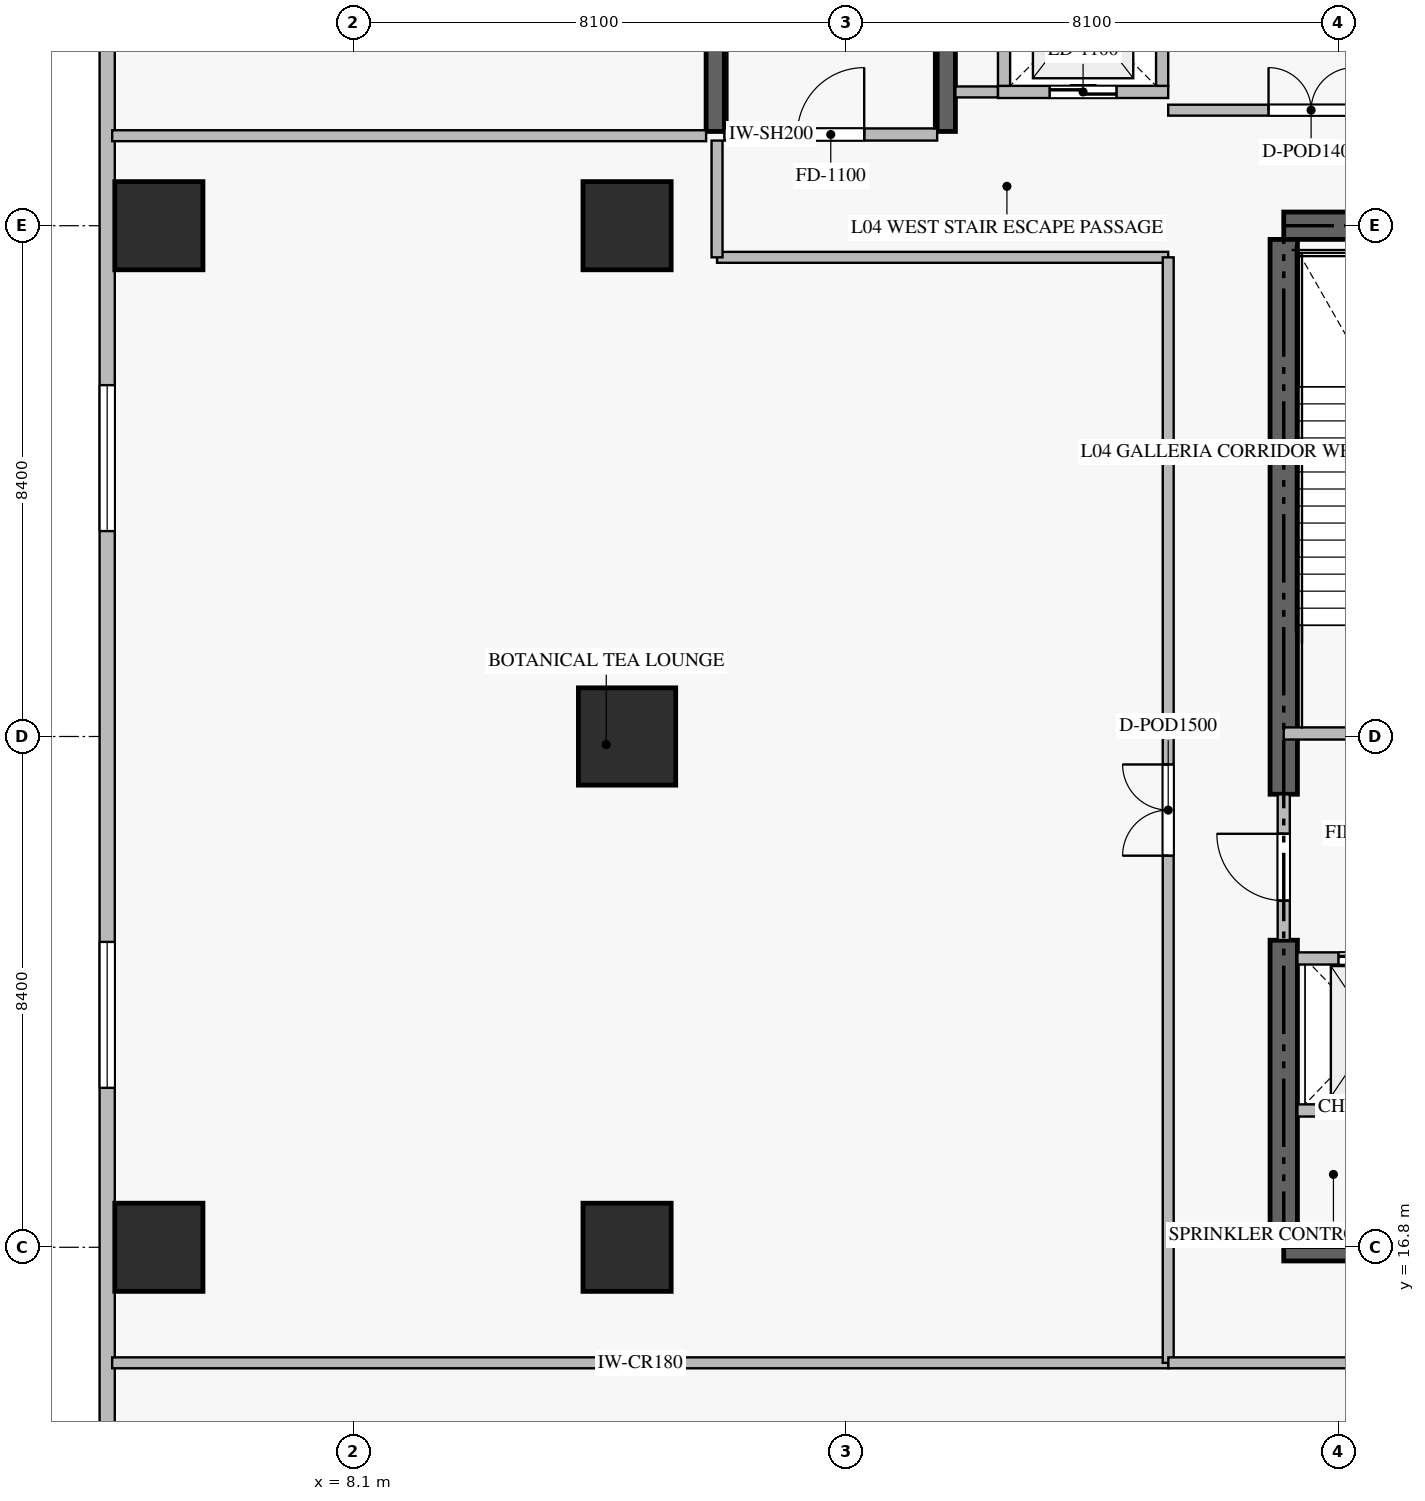
"""IFC4 building model, lengths in metres.
Left out: names, types, materials, properties, quantities, classifications, styles, units other than length and angle.
Written with IfcOpenShell. Run it as: python <this file> out.ifc"""

import sys

from ifc_helpers import new_model, si_unit, direction, frame, frame_2d, origin, origin_2d, place, context, subcontext, project, spatial, rectangle, extrude, source, transform, mapped, element, fill, save


model = new_model("IFC4")
c1 = context("Model", 3, precision=1e-05, world=origin(), true_north=direction((0.0, 1.0)))
c2 = subcontext(c1, "Body", "Model", "MODEL_VIEW")
j1 = project(units=[si_unit("LENGTHUNIT", "METRE"), si_unit("PLANEANGLEUNIT", "RADIAN")], contexts=[c1])
p1 = place(None, origin())
s1 = spatial("IfcSite", under=j1, at=p1, CompositionType="ELEMENT")
p2 = place(p1, origin())
s2 = spatial("IfcBuilding", under=s1, at=p2, CompositionType="ELEMENT")
p3 = place(p2, frame((0.0, 0.0, 21.0)))
s3 = spatial("IfcBuildingStorey", under=s2, at=p3, CompositionType="ELEMENT", Elevation=21.0)
for number, where, z_axis, x_axis in (
    (1, (23.4, 16.8, -0.85), (0.0, 0.0, 1.0), (1.0, 0.0, 0.0)),
    (2, (41.4, 33.6, -0.85), (0.0, 0.0, 1.0), (-1.0, 0.0, 0.0)),
):
    element("IfcWall", number, at=place(p3, frame(where, z_axis=z_axis, x_axis=x_axis)), inside=s3, PredefinedType="SHEAR", context=c2, shape_type="SweptSolid", body=[
        extrude(rectangle(XDim=18.0, YDim=0.45, at=frame_2d((9.0, 0.0))), origin(), (0.0, 0.0, 1.0), 6.108),
    ])
p4 = place(p3, frame((23.4, 17.025, -0.85), z_axis=(0.0, 0.0, 1.0), x_axis=(0.0, 1.0, 0.0)))
e3 = element("IfcWall", 3, at=p4, inside=s3, PredefinedType="SHEAR", context=c2, shape_type="SweptSolid", body=[
    extrude(rectangle(XDim=4.825, YDim=0.45, at=frame_2d((2.413, 0.0))), origin(), (0.0, 0.0, 1.0), 6.108),
])
p5 = place(p3, frame((23.4, 24.25, -0.85), z_axis=(0.0, 0.0, 1.0), x_axis=(0.0, 1.0, 0.0)))
e4 = element("IfcWall", 4, at=p5, inside=s3, PredefinedType="SHEAR", context=c2, shape_type="SweptSolid", body=[
    extrude(rectangle(XDim=9.125, YDim=0.45, at=frame_2d((4.562, 0.0))), origin(), (0.0, 0.0, 1.0), 6.108),
])
m1 = source(origin(), c2, "Body", "SweptSolid", [
    extrude(rectangle(XDim=1.45, YDim=1.45, at=origin_2d()), origin(), (0.0, 0.0, 1.0), 6.11),
])
p6 = place(p3, frame((12.6, 16.8, -0.85), z_axis=(0.0, 0.0, 1.0), x_axis=(1.0, 0.0, 0.0)))
e5 = element("IfcColumn", 5, at=p6, inside=s3, PredefinedType="COLUMN", context=c2, shape_type="MappedRepresentation", body=[
    mapped(m1, transform((0.0, 0.0, 0.0), scale=1.0)),
])
m2 = source(origin(), c2, "Body", "SweptSolid", [
    extrude(rectangle(XDim=1.6, YDim=1.6, at=origin_2d()), origin(), (0.0, 0.0, 1.0), 6.11),
])
p7 = place(p3, frame((12.6, 25.2, -0.85), z_axis=(0.0, 0.0, 1.0), x_axis=(1.0, 0.0, 0.0)))
e6 = element("IfcColumn", 6, at=p7, inside=s3, PredefinedType="COLUMN", context=c2, shape_type="MappedRepresentation", body=[
    mapped(m2, transform((0.0, 0.0, 0.0), scale=1.0)),
])
for number, where, z_axis, x_axis in (
    (7, (12.6, 33.6, -0.85), (0.0, 0.0, 1.0), (1.0, 0.0, 0.0)),
    (8, (4.9, 16.8, -0.85), (0.0, 0.0, 1.0), (1.0, 0.0, 0.0)),
    (9, (4.9, 33.6, -0.85), (0.0, 0.0, 1.0), (1.0, 0.0, 0.0)),
):
    element("IfcColumn", number, at=place(p3, frame(where, z_axis=z_axis, x_axis=x_axis)), inside=s3, PredefinedType="COLUMN", context=c2, shape_type="MappedRepresentation", body=[
        mapped(m1, transform((0.0, 0.0, 0.0), scale=1.0)),
    ])
p8 = place(p3, frame((4.05, 45.475, 0.0), z_axis=(0.0, 0.0, 1.0), x_axis=(0.0, -1.0, 0.0)))
e10 = element("IfcWall", 10, at=p8, inside=s3, PredefinedType="ELEMENTEDWALL", context=c2, shape_type="SweptSolid", body=[
    extrude(rectangle(XDim=40.55, YDim=0.25, at=frame_2d((20.275, 0.0))), origin(), (0.0, 0.0, 1.0), 5.245),
])
p9 = place(p8, frame((14.497, 0.0, 0.6)))
e11 = element("IfcOpeningElement", 11, at=p9, cuts=e10, PredefinedType="OPENING", context=c2, shape_type="SweptSolid", body=[
    extrude(rectangle(XDim=2.4, YDim=2.6, at=frame_2d((1.2, 1.3))), frame((0.0, 0.135, 0.0), z_axis=(0.0, -1.0, 0.0), x_axis=(1.0, 0.0, 0.0)), (0.0, 0.0, 1.0), 0.27),
])
p10 = place(p8, frame((23.653, 0.0, 0.6)))
e12 = element("IfcOpeningElement", 12, at=p10, cuts=e10, PredefinedType="OPENING", context=c2, shape_type="SweptSolid", body=[
    extrude(rectangle(XDim=2.4, YDim=2.6, at=frame_2d((1.2, 1.3))), frame((0.0, 0.135, 0.0), z_axis=(0.0, -1.0, 0.0), x_axis=(1.0, 0.0, 0.0)), (0.0, 0.0, 1.0), 0.27),
])
p11 = place(p3, frame((23.4, 25.25, 0.0), z_axis=(0.0, 0.0, 1.0), x_axis=(1.0, 0.0, 0.0)))
e13 = element("IfcWall", 13, at=p11, inside=s3, PredefinedType="STANDARD", context=c2, shape_type="SweptSolid", body=[
    extrude(rectangle(XDim=4.45, YDim=0.2, at=frame_2d((2.225, 0.0))), origin(), (0.0, 0.0, 1.0), 5.26),
])
p12 = place(p11, frame((1.65, 0.0, 0.0)))
e14 = element("IfcOpeningElement", 14, at=p12, cuts=e13, PredefinedType="OPENING", context=c2, shape_type="SweptSolid", body=[
    extrude(rectangle(XDim=1.1, YDim=2.15, at=frame_2d((0.55, 1.075))), frame((0.0, 0.11, 0.0), z_axis=(0.0, -1.0, 0.0), x_axis=(1.0, 0.0, 0.0)), (0.0, 0.0, 1.0), 0.22),
])
for number, where, z_axis, x_axis in (
    (15, (14.05, 35.15, -0.85), (0.0, 0.0, 1.0), (0.0, 1.0, 0.0)),
    (16, (17.85, 35.15, -0.85), (0.0, 0.0, 1.0), (0.0, 1.0, 0.0)),
):
    element("IfcWall", number, at=place(p3, frame(where, z_axis=z_axis, x_axis=x_axis)), inside=s3, PredefinedType="SHEAR", context=c2, shape_type="SweptSolid", body=[
        extrude(rectangle(XDim=7.9, YDim=0.3, at=frame_2d((3.95, 0.0))), origin(), (0.0, 0.0, 1.0), 6.108),
    ])
p13 = place(p3, frame((14.2, 35.1, 0.0), z_axis=(0.0, 0.0, 1.0), x_axis=(1.0, 0.0, 0.0)))
e17 = element("IfcWall", 17, at=p13, inside=s3, PredefinedType="STANDARD", context=c2, shape_type="SweptSolid", body=[
    extrude(rectangle(XDim=3.5, YDim=0.2, at=frame_2d((1.75, 0.0))), origin(), (0.0, 0.0, 1.0), 5.26),
])
p14 = place(p13, frame((1.2, 0.0, 0.0)))
e18 = element("IfcOpeningElement", 18, at=p14, cuts=e17, PredefinedType="OPENING", context=c2, shape_type="SweptSolid", body=[
    extrude(rectangle(XDim=1.1, YDim=2.15, at=frame_2d((0.55, 1.075))), frame((0.0, 0.11, 0.0), z_axis=(0.0, -1.0, 0.0), x_axis=(1.0, 0.0, 0.0)), (0.0, 0.0, 1.0), 0.22),
])
p15 = place(p3, frame((23.625, 21.55, 0.0), z_axis=(0.0, 0.0, 1.0), x_axis=(1.0, 0.0, 0.0)))
e19 = element("IfcWall", 19, at=p15, inside=s3, PredefinedType="STANDARD", context=c2, shape_type="SweptSolid", body=[
    extrude(rectangle(XDim=2.425, YDim=0.2, at=frame_2d((1.212, 0.0))), origin(), (0.0, 0.0, 1.0), 5.26),
])
p16 = place(p15, frame((0.675, 0.0, 0.0)))
e20 = element("IfcOpeningElement", 20, at=p16, cuts=e19, PredefinedType="OPENING", context=c2, shape_type="SweptSolid", body=[
    extrude(rectangle(XDim=1.2, YDim=2.2, at=frame_2d((0.6, 1.1))), frame((0.0, 0.11, 0.0), z_axis=(0.0, -1.0, 0.0), x_axis=(1.0, 0.0, 0.0)), (0.0, 0.0, 1.0), 0.22),
])
p17 = place(p3, frame((18.7, 35.8, 0.0), z_axis=(0.0, 0.0, 1.0), x_axis=(1.0, 0.0, 0.0)))
e21 = element("IfcWall", 21, at=p17, inside=s3, PredefinedType="STANDARD", context=c2, shape_type="SweptSolid", body=[
    extrude(rectangle(XDim=2.8, YDim=0.2, at=frame_2d((1.4, 0.0))), origin(), (0.0, 0.0, 1.0), 5.26),
])
p18 = place(p17, frame((0.85, 0.0, 0.0)))
e22 = element("IfcOpeningElement", 22, at=p18, cuts=e21, PredefinedType="OPENING", context=c2, shape_type="SweptSolid", body=[
    extrude(rectangle(XDim=1.1, YDim=2.2, at=frame_2d((0.55, 1.1))), frame((0.0, 0.11, 0.0), z_axis=(0.0, -1.0, 0.0), x_axis=(1.0, 0.0, 0.0)), (0.0, 0.0, 1.0), 0.22),
])
for number, where, z_axis, x_axis in (
    (23, (18.8, 35.9, 0.0), (0.0, 0.0, 1.0), (0.0, 1.0, 0.0)),
    (24, (21.4, 35.9, 0.0), (0.0, 0.0, 1.0), (0.0, 1.0, 0.0)),
):
    element("IfcWall", number, at=place(p3, frame(where, z_axis=z_axis, x_axis=x_axis)), inside=s3, PredefinedType="STANDARD", context=c2, shape_type="SweptSolid", body=[
        extrude(rectangle(XDim=2.4, YDim=0.2, at=frame_2d((1.2, 0.0))), origin(), (0.0, 0.0, 1.0), 5.26),
    ])
p19 = place(p3, frame((23.625, 19.05, 0.0), z_axis=(0.0, 0.0, 1.0), x_axis=(1.0, 0.0, 0.0)))
e25 = element("IfcWall", 25, at=p19, inside=s3, PredefinedType="STANDARD", context=c2, shape_type="SweptSolid", body=[
    extrude(rectangle(XDim=2.425, YDim=0.2, at=frame_2d((1.212, 0.0))), origin(), (0.0, 0.0, 1.0), 5.26),
])
p20 = place(p3, frame((23.4, 21.852, 0.0), z_axis=(0.0, 0.0, 1.0), x_axis=(0.0, 1.0, 0.0)))
e26 = element("IfcWall", 26, at=p20, inside=s3, PredefinedType="STANDARD", context=c2, shape_type="SweptSolid", body=[
    extrude(rectangle(XDim=2.396, YDim=0.2, at=frame_2d((1.198, 0.0))), origin(), (0.0, 0.0, 1.0), 5.26),
])
p21 = place(p20, frame((0.648, 0.0, 0.0)))
e27 = element("IfcOpeningElement", 27, at=p21, cuts=e26, PredefinedType="OPENING", context=c2, shape_type="SweptSolid", body=[
    extrude(rectangle(XDim=1.1, YDim=2.15, at=frame_2d((0.55, 1.075))), frame((0.0, 0.11, 0.0), z_axis=(0.0, -1.0, 0.0), x_axis=(1.0, 0.0, 0.0)), (0.0, 0.0, 1.0), 0.22),
])
p22 = place(p3, frame((4.132, 14.9, 0.0), z_axis=(0.0, 0.0, 1.0), x_axis=(1.0, 0.0, 0.0)))
e28 = element("IfcWall", 28, at=p22, inside=s3, PredefinedType="PARTITIONING", context=c2, shape_type="SweptSolid", body=[
    extrude(rectangle(XDim=17.368, YDim=0.18, at=frame_2d((8.684, 0.0))), origin(), (0.0, 0.0, 1.0), 5.26),
])
p23 = place(p3, frame((4.132, 35.08, 0.0), z_axis=(0.0, 0.0, 1.0), x_axis=(1.0, 0.0, 0.0)))
e29 = element("IfcWall", 29, at=p23, inside=s3, PredefinedType="PARTITIONING", context=c2, shape_type="SweptSolid", body=[
    extrude(rectangle(XDim=9.768, YDim=0.18, at=frame_2d((4.884, 0.0))), origin(), (0.0, 0.0, 1.0), 5.26),
])
p24 = place(p3, frame((14.08, 33.08, 0.0), z_axis=(0.0, 0.0, 1.0), x_axis=(1.0, 0.0, 0.0)))
e30 = element("IfcWall", 30, at=p24, inside=s3, PredefinedType="PARTITIONING", context=c2, shape_type="SweptSolid", body=[
    extrude(rectangle(XDim=7.42, YDim=0.18, at=frame_2d((3.71, 0.0))), origin(), (0.0, 0.0, 1.0), 2.845),
])
p25 = place(p3, frame((18.0, 35.8, 0.0), z_axis=(0.0, 0.0, 1.0), x_axis=(1.0, 0.0, 0.0)))
e31 = element("IfcWall", 31, at=p25, inside=s3, PredefinedType="PARTITIONING", context=c2, shape_type="SweptSolid", body=[
    extrude(rectangle(XDim=0.698, YDim=0.18, at=frame_2d((0.349, 0.0))), origin(), (0.0, 0.0, 1.0), 5.26),
])
p26 = place(p3, frame((14.08, 33.08, 0.0), z_axis=(0.0, 0.0, 1.0), x_axis=(0.0, 1.0, 0.0)))
e32 = element("IfcWall", 32, at=p26, inside=s3, PredefinedType="PARTITIONING", context=c2, shape_type="SweptSolid", body=[
    extrude(rectangle(XDim=1.92, YDim=0.18, at=frame_2d((0.96, 0.0))), origin(), (0.0, 0.0, 1.0), 5.26),
])
p27 = place(p3, frame((21.5, 14.9, 0.0), z_axis=(0.0, 0.0, 1.0), x_axis=(0.0, 1.0, 0.0)))
e33 = element("IfcWall", 33, at=p27, inside=s3, PredefinedType="PARTITIONING", context=c2, shape_type="SweptSolid", body=[
    extrude(rectangle(XDim=18.18, YDim=0.18, at=frame_2d((9.09, 0.0))), origin(), (0.0, 0.0, 1.0), 5.26),
])
p28 = place(p27, frame((8.34, 0.0, 0.0)))
e34 = element("IfcOpeningElement", 34, at=p28, cuts=e33, PredefinedType="OPENING", context=c2, shape_type="SweptSolid", body=[
    extrude(rectangle(XDim=1.5, YDim=2.25, at=frame_2d((0.75, 1.125))), frame((0.0, 0.1, 0.0), z_axis=(0.0, -1.0, 0.0), x_axis=(1.0, 0.0, 0.0)), (0.0, 0.0, 1.0), 0.2),
])
p29 = place(p3, frame((21.502, 14.9, 0.0), z_axis=(0.0, 0.0, 1.0), x_axis=(1.0, 0.0, 0.0)))
e35 = element("IfcWall", 35, at=p29, inside=s3, PredefinedType="PARTITIONING", context=c2, shape_type="SweptSolid", body=[
    extrude(rectangle(XDim=9.098, YDim=0.18, at=frame_2d((4.549, 0.0))), origin(), (0.0, 0.0, 1.0), 5.26),
])
p30 = place(p29, frame((3.799, 0.0, 0.0)))
e36 = element("IfcOpeningElement", 36, at=p30, cuts=e35, PredefinedType="OPENING", context=c2, shape_type="SweptSolid", body=[
    extrude(rectangle(XDim=1.5, YDim=2.25, at=frame_2d((0.75, 1.125))), frame((0.0, 0.1, 0.0), z_axis=(0.0, -1.0, 0.0), x_axis=(1.0, 0.0, 0.0)), (0.0, 0.0, 1.0), 0.2),
])
p31 = place(p3, frame((21.5, 35.5, 0.0), z_axis=(0.0, 0.0, 1.0), x_axis=(1.0, 0.0, 0.0)))
e37 = element("IfcWall", 37, at=p31, inside=s3, PredefinedType="PARTITIONING", context=c2, shape_type="SweptSolid", body=[
    extrude(rectangle(XDim=4.7, YDim=0.18, at=frame_2d((2.35, 0.0))), origin(), (0.0, 0.0, 1.0), 5.26),
])
p32 = place(p31, frame((1.65, 0.0, 0.0)))
e38 = element("IfcOpeningElement", 38, at=p32, cuts=e37, PredefinedType="OPENING", context=c2, shape_type="SweptSolid", body=[
    extrude(rectangle(XDim=1.4, YDim=2.25, at=frame_2d((0.7, 1.125))), frame((0.0, 0.1, 0.0), z_axis=(0.0, -1.0, 0.0), x_axis=(1.0, 0.0, 0.0)), (0.0, 0.0, 1.0), 0.2),
])
m3 = source(origin(), c2, "Body", "SweptSolid", [
    extrude(rectangle(XDim=2.4, YDim=2.6, at=frame_2d((1.2, 1.3))), frame((0.0, 0.03, 0.0), z_axis=(0.0, -1.0, 0.0), x_axis=(1.0, 0.0, 0.0)), (0.0, 0.0, 1.0), 0.06),
])
p33 = place(p9, origin())
e39 = element("IfcWindow", 39, at=p33, inside=s3, PartitioningType="SINGLE_PANEL", PredefinedType="WINDOW", context=c2, shape_type="MappedRepresentation", body=[
    mapped(m3, transform((0.0, 0.0, 0.0), scale=1.0)),
])
fill(e11, e39)
p34 = place(p10, origin())
e40 = element("IfcWindow", 40, at=p34, inside=s3, PartitioningType="SINGLE_PANEL", PredefinedType="WINDOW", context=c2, shape_type="MappedRepresentation", body=[
    mapped(m3, transform((0.0, 0.0, 0.0), scale=1.0)),
])
fill(e12, e40)
m4 = source(origin(), c2, "Body", "SweptSolid", [
    extrude(rectangle(XDim=1.1, YDim=2.15, at=frame_2d((0.55, 1.075))), frame((0.0, 0.025, 0.0), z_axis=(0.0, -1.0, 0.0), x_axis=(1.0, 0.0, 0.0)), (0.0, 0.0, 1.0), 0.05),
])
p35 = place(p14, origin())
e41 = element("IfcDoor", 41, at=p35, inside=s3, OperationType="SINGLE_SWING_RIGHT", PredefinedType="DOOR", context=c2, shape_type="MappedRepresentation", body=[
    mapped(m4, transform((0.0, 0.0, 0.0), scale=1.0)),
])
fill(e18, e41)
m5 = source(origin(), c2, "Body", "SweptSolid", [
    extrude(rectangle(XDim=1.2, YDim=2.2, at=frame_2d((0.6, 1.1))), frame((0.0, 0.025, 0.0), z_axis=(0.0, -1.0, 0.0), x_axis=(1.0, 0.0, 0.0)), (0.0, 0.0, 1.0), 0.05),
])
p36 = place(p16, origin())
e42 = element("IfcDoor", 42, at=p36, inside=s3, OperationType="DOUBLE_DOOR_SLIDING", PredefinedType="DOOR", context=c2, shape_type="MappedRepresentation", body=[
    mapped(m5, transform((0.0, 0.0, 0.0), scale=1.0)),
])
fill(e20, e42)
m6 = source(origin(), c2, "Body", "SweptSolid", [
    extrude(rectangle(XDim=1.1, YDim=2.2, at=frame_2d((0.55, 1.1))), frame((0.0, 0.025, 0.0), z_axis=(0.0, -1.0, 0.0), x_axis=(1.0, 0.0, 0.0)), (0.0, 0.0, 1.0), 0.05),
])
p37 = place(p18, origin())
e43 = element("IfcDoor", 43, at=p37, inside=s3, OperationType="DOUBLE_DOOR_SLIDING", PredefinedType="DOOR", context=c2, shape_type="MappedRepresentation", body=[
    mapped(m6, transform((0.0, 0.0, 0.0), scale=1.0)),
])
fill(e22, e43)
p38 = place(p21, origin())
e44 = element("IfcDoor", 44, at=p38, inside=s3, OperationType="SINGLE_SWING_RIGHT", PredefinedType="DOOR", context=c2, shape_type="MappedRepresentation", body=[
    mapped(m4, transform((0.0, 0.0, 0.0), scale=1.0)),
])
fill(e27, e44)
m7 = source(origin(), c2, "Body", "SweptSolid", [
    extrude(rectangle(XDim=1.5, YDim=2.25, at=frame_2d((0.75, 1.125))), frame((0.0, 0.025, 0.0), z_axis=(0.0, -1.0, 0.0), x_axis=(1.0, 0.0, 0.0)), (0.0, 0.0, 1.0), 0.05),
])
p39 = place(p28, origin())
e45 = element("IfcDoor", 45, at=p39, inside=s3, OperationType="DOUBLE_DOOR_SINGLE_SWING", PredefinedType="DOOR", context=c2, shape_type="MappedRepresentation", body=[
    mapped(m7, transform((0.0, 0.0, 0.0), scale=1.0)),
])
fill(e34, e45)
m8 = source(origin(), c2, "Body", "SweptSolid", [
    extrude(rectangle(XDim=1.4, YDim=2.25, at=frame_2d((0.7, 1.125))), frame((0.0, 0.025, 0.0), z_axis=(0.0, -1.0, 0.0), x_axis=(1.0, 0.0, 0.0)), (0.0, 0.0, 1.0), 0.05),
])
p40 = place(p32, origin())
e46 = element("IfcDoor", 46, at=p40, inside=s3, OperationType="DOUBLE_DOOR_SINGLE_SWING", PredefinedType="DOOR", context=c2, shape_type="MappedRepresentation", body=[
    mapped(m8, transform((0.0, 0.0, 0.0), scale=1.0)),
])
fill(e38, e46)
save(model, sys.argv[1])
